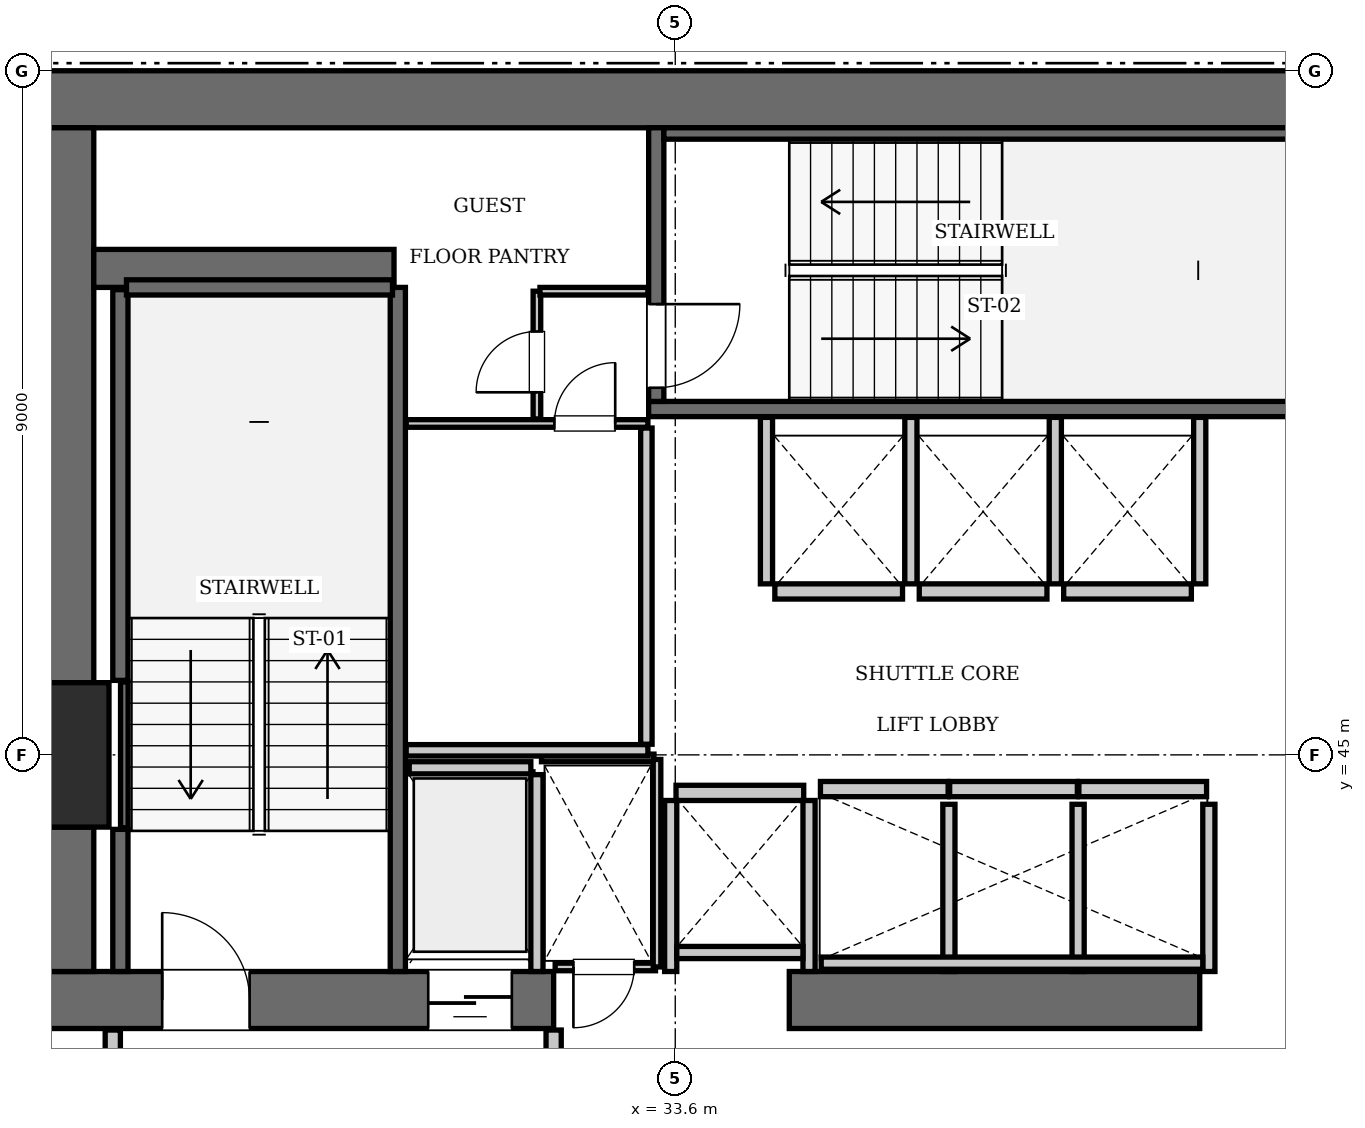
"""IFC4 building model, lengths in metres.
Left out: names, types, materials, properties, quantities, classifications, styles, units other than length and angle.
Written with IfcOpenShell. Run it as: python <this file> out.ifc"""

import sys

from ifc_helpers import new_model, si_unit, direction, frame, frame_2d, origin, origin_2d, place, context, subcontext, project, spatial, rectangle, extrude, element, fill, save


model = new_model("IFC4")
c1 = context("Model", 3, precision=1e-05, world=origin(), true_north=direction((0.0, 1.0)))
c2 = subcontext(c1, "Body", "Model", "MODEL_VIEW")
j1 = project(units=[si_unit("LENGTHUNIT", "METRE"), si_unit("PLANEANGLEUNIT", "RADIAN")], contexts=[c1])
p1 = place(None, origin())
s1 = spatial("IfcSite", under=j1, at=p1, CompositionType="ELEMENT")
p2 = place(p1, origin())
s2 = spatial("IfcBuilding", under=s1, at=p2, CompositionType="ELEMENT")
p3 = place(p2, frame((0.0, 0.0, 200.55)))
s3 = spatial("IfcBuildingStorey", under=s2, at=p3, CompositionType="ELEMENT", Elevation=200.55)
p4 = place(p3, frame((25.2, 45.0, 0.0), z_axis=(0.0, 0.0, 1.0), x_axis=(1.0, 0.0, 0.0)))
e1 = element("IfcColumn", 1, at=p4, inside=s3, PredefinedType="COLUMN", context=c2, shape_type="SweptSolid", body=[
    extrude(rectangle(XDim=1.9, YDim=1.9, at=origin_2d()), origin(), (0.0, 0.0, 1.0), 3.85),
])
p5 = place(p3, frame((25.2, 53.625, 0.0), z_axis=(0.0, 0.0, 1.0), x_axis=(1.0, 0.0, 0.0)))
e2 = element("IfcWall", 2, at=p5, inside=s3, PredefinedType="SHEAR", context=c2, shape_type="SweptSolid", body=[
    extrude(rectangle(XDim=25.2, YDim=0.75, at=frame_2d((12.6, 0.0))), origin(), (0.0, 0.0, 1.0), 3.85),
])
p6 = place(p3, frame((25.2, 41.775, 0.0), z_axis=(0.0, 0.0, 1.0), x_axis=(1.0, 0.0, 0.0)))
e3 = element("IfcWall", 3, at=p6, inside=s3, PredefinedType="SHEAR", context=c2, shape_type="SweptSolid", body=[
    extrude(rectangle(XDim=6.8, YDim=0.75, at=frame_2d((3.4, 0.0))), origin(), (0.0, 0.0, 1.0), 3.85),
])
p7 = place(p6, frame((1.65, 0.0, 0.0)))
e4 = element("IfcOpeningElement", 4, at=p7, cuts=e3, PredefinedType="OPENING", context=c2, shape_type="SweptSolid", body=[
    extrude(rectangle(XDim=1.15, YDim=2.15, at=frame_2d((0.575, 1.075))), frame((0.0, 0.385, 0.0), z_axis=(0.0, -1.0, 0.0), x_axis=(1.0, 0.0, 0.0)), (0.0, 0.0, 1.0), 0.77),
])
p8 = place(p6, frame((5.15, 0.0, 0.0)))
e5 = element("IfcOpeningElement", 5, at=p8, cuts=e3, PredefinedType="OPENING", context=c2, shape_type="SweptSolid", body=[
    extrude(rectangle(XDim=1.1, YDim=2.2, at=frame_2d((0.55, 1.1))), frame((0.0, 0.385, 0.0), z_axis=(0.0, -1.0, 0.0), x_axis=(1.0, 0.0, 0.0)), (0.0, 0.0, 1.0), 0.77),
])
p9 = place(p3, frame((35.1, 41.775, 0.0), z_axis=(0.0, 0.0, 1.0), x_axis=(1.0, 0.0, 0.0)))
e6 = element("IfcWall", 6, at=p9, inside=s3, PredefinedType="SHEAR", context=c2, shape_type="SweptSolid", body=[
    extrude(rectangle(XDim=5.4, YDim=0.75, at=frame_2d((2.7, 0.0))), origin(), (0.0, 0.0, 1.0), 3.85),
])
p10 = place(p3, frame((25.575, 42.15, 0.0), z_axis=(0.0, 0.0, 1.0), x_axis=(0.0, 1.0, 0.0)))
e7 = element("IfcWall", 7, at=p10, inside=s3, PredefinedType="SHEAR", context=c2, shape_type="SweptSolid", body=[
    extrude(rectangle(XDim=1.9, YDim=0.75, at=frame_2d((0.95, 0.0))), origin(), (0.0, 0.0, 1.0), 3.85),
])
p11 = place(p3, frame((25.575, 45.95, 0.0), z_axis=(0.0, 0.0, 1.0), x_axis=(0.0, 1.0, 0.0)))
e8 = element("IfcWall", 8, at=p11, inside=s3, PredefinedType="SHEAR", context=c2, shape_type="SweptSolid", body=[
    extrude(rectangle(XDim=7.3, YDim=0.75, at=frame_2d((3.65, 0.0))), origin(), (0.0, 0.0, 1.0), 3.85),
])
p12 = place(p3, frame((25.95, 51.4, 0.0), z_axis=(0.0, 0.0, 1.0), x_axis=(1.0, 0.0, 0.0)))
e9 = element("IfcWall", 9, at=p12, inside=s3, PredefinedType="SHEAR", context=c2, shape_type="SweptSolid", body=[
    extrude(rectangle(XDim=3.95, YDim=0.5, at=frame_2d((1.975, 0.0))), origin(), (0.0, 0.0, 1.0), 3.85),
])
p13 = place(p3, frame((29.95, 42.15, 0.0), z_axis=(0.0, 0.0, 1.0), x_axis=(0.0, 1.0, 0.0)))
e10 = element("IfcWall", 10, at=p13, inside=s3, PredefinedType="SOLIDWALL", context=c2, shape_type="SweptSolid", body=[
    extrude(rectangle(XDim=9.0, YDim=0.2, at=frame_2d((4.5, 0.0))), origin(), (0.0, 0.0, 1.0), 3.61),
])
p14 = place(p3, frame((26.3, 42.15, 0.0), z_axis=(0.0, 0.0, 1.0), x_axis=(0.0, 1.0, 0.0)))
e11 = element("IfcWall", 11, at=p14, inside=s3, PredefinedType="SOLIDWALL", context=c2, shape_type="SweptSolid", body=[
    extrude(rectangle(XDim=1.87, YDim=0.2, at=frame_2d((0.935, 0.0))), origin(), (0.0, 0.0, 1.0), 3.61),
])
p15 = place(p3, frame((26.3, 45.98, 0.0), z_axis=(0.0, 0.0, 1.0), x_axis=(0.0, 1.0, 0.0)))
e12 = element("IfcWall", 12, at=p15, inside=s3, PredefinedType="SOLIDWALL", context=c2, shape_type="SweptSolid", body=[
    extrude(rectangle(XDim=5.14, YDim=0.2, at=frame_2d((2.57, 0.0))), origin(), (0.0, 0.0, 1.0), 3.61),
])
p16 = place(p3, frame((26.38, 51.15, 0.0), z_axis=(0.0, 0.0, 1.0), x_axis=(1.0, 0.0, 0.0)))
e13 = element("IfcWall", 13, at=p16, inside=s3, PredefinedType="SOLIDWALL", context=c2, shape_type="SweptSolid", body=[
    extrude(rectangle(XDim=3.5, YDim=0.2, at=frame_2d((1.75, 0.0))), origin(), (0.0, 0.0, 1.0), 3.61),
])
p17 = place(p3, frame((26.352, 44.04, 0.0), z_axis=(0.0, 0.0, 1.0), x_axis=(0.0, 1.0, 0.0)))
e14 = element("IfcWall", 14, at=p17, inside=s3, PredefinedType="SOLIDWALL", context=c2, shape_type="SweptSolid", body=[
    extrude(rectangle(XDim=1.92, YDim=0.1, at=frame_2d((0.96, 0.0))), origin(), (0.0, 0.0, 1.0), 3.61),
])
p18 = place(p3, frame((33.25, 49.55, 0.0), z_axis=(0.0, 0.0, 1.0), x_axis=(1.0, 0.0, 0.0)))
e15 = element("IfcWall", 15, at=p18, inside=s3, PredefinedType="SOLIDWALL", context=c2, shape_type="SweptSolid", body=[
    extrude(rectangle(XDim=9.1, YDim=0.2, at=frame_2d((4.55, 0.0))), origin(), (0.0, 0.0, 1.0), 3.61),
])
p19 = place(p3, frame((33.35, 49.65, 0.0), z_axis=(0.0, 0.0, 1.0), x_axis=(0.0, 1.0, 0.0)))
e16 = element("IfcWall", 16, at=p19, inside=s3, PredefinedType="SOLIDWALL", context=c2, shape_type="SweptSolid", body=[
    extrude(rectangle(XDim=3.6, YDim=0.2, at=frame_2d((1.8, 0.0))), origin(), (0.0, 0.0, 1.0), 3.61),
])
p20 = place(p19, frame((0.18, 0.0, 0.0)))
e17 = element("IfcOpeningElement", 17, at=p20, cuts=e16, PredefinedType="OPENING", context=c2, shape_type="SweptSolid", body=[
    extrude(rectangle(XDim=1.1, YDim=2.15, at=frame_2d((0.55, 1.075))), frame((0.0, 0.11, 0.0), z_axis=(0.0, -1.0, 0.0), x_axis=(1.0, 0.0, 0.0)), (0.0, 0.0, 1.0), 0.22),
])
p21 = place(p3, frame((33.45, 53.175, 0.0), z_axis=(0.0, 0.0, 1.0), x_axis=(1.0, 0.0, 0.0)))
e18 = element("IfcWall", 18, at=p21, inside=s3, PredefinedType="SOLIDWALL", context=c2, shape_type="SweptSolid", body=[
    extrude(rectangle(XDim=8.7, YDim=0.15, at=frame_2d((4.35, 0.0))), origin(), (0.0, 0.0, 1.0), 3.61),
])
for number, where, z_axis, x_axis in (
    (19, (35.51, 44.55, 0.0), (0.0, 0.0, 1.0), (1.0, 0.0, 0.0)),
    (20, (37.21, 44.55, 0.0), (0.0, 0.0, 1.0), (1.0, 0.0, 0.0)),
):
    element("IfcWall", number, at=place(p3, frame(where, z_axis=z_axis, x_axis=x_axis)), inside=s3, PredefinedType="SOLIDWALL", context=c2, shape_type="SweptSolid", body=[
        extrude(rectangle(XDim=1.68, YDim=0.2, at=frame_2d((0.84, 0.0))), origin(), (0.0, 0.0, 1.0), 3.61),
    ])
for number, where, z_axis, x_axis in (
    (21, (38.91, 44.55, 0.0), (0.0, 0.0, 1.0), (1.0, 0.0, 0.0)),
    (22, (34.91, 47.15, 0.0), (0.0, 0.0, 1.0), (1.0, 0.0, 0.0)),
):
    element("IfcWall", number, at=place(p3, frame(where, z_axis=z_axis, x_axis=x_axis)), inside=s3, PredefinedType="SOLIDWALL", context=c2, shape_type="SweptSolid", body=[
        extrude(rectangle(XDim=1.68, YDim=0.2, at=frame_2d((0.84, 0.0))), origin(), (0.0, 0.0, 1.0), 3.61),
    ])
for number, where, z_axis, x_axis in (
    (23, (36.81, 47.15, 0.0), (0.0, 0.0, 1.0), (1.0, 0.0, 0.0)),
    (24, (38.71, 47.15, 0.0), (0.0, 0.0, 1.0), (1.0, 0.0, 0.0)),
    (25, (33.61, 44.5, 0.0), (0.0, 0.0, 1.0), (1.0, 0.0, 0.0)),
):
    element("IfcWall", number, at=place(p3, frame(where, z_axis=z_axis, x_axis=x_axis)), inside=s3, PredefinedType="SOLIDWALL", context=c2, shape_type="SweptSolid", body=[
        extrude(rectangle(XDim=1.68, YDim=0.2, at=frame_2d((0.84, 0.0))), origin(), (0.0, 0.0, 1.0), 3.61),
    ])
p22 = place(p3, frame((30.1, 44.83, 0.0), z_axis=(0.0, 0.0, 1.0), x_axis=(1.0, 0.0, 0.0)))
e26 = element("IfcWall", 26, at=p22, inside=s3, PredefinedType="SOLIDWALL", context=c2, shape_type="SweptSolid", body=[
    extrude(rectangle(XDim=1.6, YDim=0.16, at=frame_2d((0.8, 0.0))), origin(), (0.0, 0.0, 1.0), 3.61),
])
p23 = place(p3, frame((31.78, 42.15, 0.0), z_axis=(0.0, 0.0, 1.0), x_axis=(0.0, 1.0, 0.0)))
e27 = element("IfcWall", 27, at=p23, inside=s3, PredefinedType="SOLIDWALL", context=c2, shape_type="SweptSolid", body=[
    extrude(rectangle(XDim=2.59, YDim=0.16, at=frame_2d((1.295, 0.0))), origin(), (0.0, 0.0, 1.0), 3.61),
])
for number, where, z_axis, x_axis in (
    (28, (37.2, 42.15, 0.0), (0.0, 0.0, 1.0), (0.0, 1.0, 0.0)),
    (29, (38.9, 42.15, 0.0), (0.0, 0.0, 1.0), (0.0, 1.0, 0.0)),
    (30, (40.62, 42.15, 0.0), (0.0, 0.0, 1.0), (0.0, 1.0, 0.0)),
):
    element("IfcWall", number, at=place(p3, frame(where, z_axis=z_axis, x_axis=x_axis)), inside=s3, PredefinedType="SOLIDWALL", context=c2, shape_type="SweptSolid", body=[
        extrude(rectangle(XDim=2.2, YDim=0.16, at=frame_2d((1.1, 0.0))), origin(), (0.0, 0.0, 1.0), 3.61),
    ])
p24 = place(p3, frame((35.52, 42.26, 0.0), z_axis=(0.0, 0.0, 1.0), x_axis=(1.0, 0.0, 0.0)))
e31 = element("IfcWall", 31, at=p24, inside=s3, PredefinedType="SOLIDWALL", context=c2, shape_type="SweptSolid", body=[
    extrude(rectangle(XDim=5.02, YDim=0.16, at=frame_2d((2.51, 0.0))), origin(), (0.0, 0.0, 1.0), 3.61),
])
for number, where, z_axis, x_axis in (
    (32, (34.8, 47.25, 0.0), (0.0, 0.0, 1.0), (0.0, 1.0, 0.0)),
    (33, (36.7, 47.25, 0.0), (0.0, 0.0, 1.0), (0.0, 1.0, 0.0)),
    (34, (38.6, 47.25, 0.0), (0.0, 0.0, 1.0), (0.0, 1.0, 0.0)),
    (35, (40.5, 47.25, 0.0), (0.0, 0.0, 1.0), (0.0, 1.0, 0.0)),
):
    element("IfcWall", number, at=place(p3, frame(where, z_axis=z_axis, x_axis=x_axis)), inside=s3, PredefinedType="SOLIDWALL", context=c2, shape_type="SweptSolid", body=[
        extrude(rectangle(XDim=2.19, YDim=0.16, at=frame_2d((1.095, 0.0))), origin(), (0.0, 0.0, 1.0), 3.61),
    ])
for number, where, z_axis, x_axis in (
    (36, (33.54, 42.15, 0.0), (0.0, 0.0, 1.0), (0.0, 1.0, 0.0)),
    (37, (35.36, 42.15, 0.0), (0.0, 0.0, 1.0), (0.0, 1.0, 0.0)),
):
    element("IfcWall", number, at=place(p3, frame(where, z_axis=z_axis, x_axis=x_axis)), inside=s3, PredefinedType="SOLIDWALL", context=c2, shape_type="SweptSolid", body=[
        extrude(rectangle(XDim=2.25, YDim=0.16, at=frame_2d((1.125, 0.0))), origin(), (0.0, 0.0, 1.0), 3.61),
    ])
p25 = place(p3, frame((33.62, 42.4, 0.0), z_axis=(0.0, 0.0, 1.0), x_axis=(1.0, 0.0, 0.0)))
e38 = element("IfcWall", 38, at=p25, inside=s3, PredefinedType="SOLIDWALL", context=c2, shape_type="SweptSolid", body=[
    extrude(rectangle(XDim=1.66, YDim=0.16, at=frame_2d((0.83, 0.0))), origin(), (0.0, 0.0, 1.0), 3.61),
])
for number, where, z_axis, x_axis in (
    (39, (26.2, 38.31, 0.0), (0.0, 0.0, 1.0), (0.0, 1.0, 0.0)),
    (40, (32.0, 38.31, 0.0), (0.0, 0.0, 1.0), (0.0, 1.0, 0.0)),
):
    element("IfcWall", number, at=place(p3, frame(where, z_axis=z_axis, x_axis=x_axis)), inside=s3, PredefinedType="PARTITIONING", context=c2, shape_type="SweptSolid", body=[
        extrude(rectangle(XDim=3.07, YDim=0.2, at=frame_2d((1.535, 0.0))), origin(), (0.0, 0.0, 1.0), 3.61),
    ])
p26 = place(p3, frame((32.02, 42.21, 0.0), z_axis=(0.0, 0.0, 1.0), x_axis=(1.0, 0.0, 0.0)))
e41 = element("IfcWall", 41, at=p26, inside=s3, PredefinedType="PARTITIONING", context=c2, shape_type="SweptSolid", body=[
    extrude(rectangle(XDim=1.32, YDim=0.1, at=frame_2d((0.66, 0.0))), origin(), (0.0, 0.0, 1.0), 3.61),
])
p27 = place(p26, frame((0.24, 0.0, 0.0)))
e42 = element("IfcOpeningElement", 42, at=p27, cuts=e41, PredefinedType="OPENING", context=c2, shape_type="SweptSolid", body=[
    extrude(rectangle(XDim=0.8, YDim=2.05, at=frame_2d((0.4, 1.025))), frame((0.0, 0.06, 0.0), z_axis=(0.0, -1.0, 0.0), x_axis=(1.0, 0.0, 0.0)), (0.0, 0.0, 1.0), 0.12),
])
p28 = place(p3, frame((31.84, 44.96, 0.0), z_axis=(0.0, 0.0, 1.0), x_axis=(1.0, 0.0, 0.0)))
e43 = element("IfcWall", 43, at=p28, inside=s3, PredefinedType="PARTITIONING", context=c2, shape_type="SweptSolid", body=[
    extrude(rectangle(XDim=1.48, YDim=0.1, at=frame_2d((0.74, 0.0))), origin(), (0.0, 0.0, 1.0), 3.61),
])
p29 = place(p3, frame((33.36, 42.21, 0.0), z_axis=(0.0, 0.0, 1.0), x_axis=(0.0, 1.0, 0.0)))
e44 = element("IfcWall", 44, at=p29, inside=s3, PredefinedType="PARTITIONING", context=c2, shape_type="SweptSolid", body=[
    extrude(rectangle(XDim=2.73, YDim=0.1, at=frame_2d((1.365, 0.0))), origin(), (0.0, 0.0, 1.0), 3.61),
])
p30 = place(p3, frame((30.06, 45.06, 0.0), z_axis=(0.0, 0.0, 1.0), x_axis=(1.0, 0.0, 0.0)))
e45 = element("IfcWall", 45, at=p30, inside=s3, PredefinedType="PARTITIONING", context=c2, shape_type="SweptSolid", body=[
    extrude(rectangle(XDim=3.18, YDim=0.15, at=frame_2d((1.59, 0.0))), origin(), (0.0, 0.0, 1.0), 3.61),
])
p31 = place(p3, frame((33.22, 45.14, 0.0), z_axis=(0.0, 0.0, 1.0), x_axis=(0.0, 1.0, 0.0)))
e46 = element("IfcWall", 46, at=p31, inside=s3, PredefinedType="PARTITIONING", context=c2, shape_type="SweptSolid", body=[
    extrude(rectangle(XDim=4.16, YDim=0.15, at=frame_2d((2.08, 0.0))), origin(), (0.0, 0.0, 1.0), 3.61),
])
p32 = place(p3, frame((30.06, 49.36, 0.0), z_axis=(0.0, 0.0, 1.0), x_axis=(1.0, 0.0, 0.0)))
e47 = element("IfcWall", 47, at=p32, inside=s3, PredefinedType="PARTITIONING", context=c2, shape_type="SweptSolid", body=[
    extrude(rectangle(XDim=3.18, YDim=0.1, at=frame_2d((1.59, 0.0))), origin(), (0.0, 0.0, 1.0), 3.61),
])
p33 = place(p32, frame((1.95, 0.0, 0.0)))
e48 = element("IfcOpeningElement", 48, at=p33, cuts=e47, PredefinedType="OPENING", context=c2, shape_type="SweptSolid", body=[
    extrude(rectangle(XDim=0.8, YDim=2.05, at=frame_2d((0.4, 1.025))), frame((0.0, 0.06, 0.0), z_axis=(0.0, -1.0, 0.0), x_axis=(1.0, 0.0, 0.0)), (0.0, 0.0, 1.0), 0.12),
])
p34 = place(p3, frame((31.78, 49.42, 0.0), z_axis=(0.0, 0.0, 1.0), x_axis=(0.0, 1.0, 0.0)))
e49 = element("IfcWall", 49, at=p34, inside=s3, PredefinedType="PARTITIONING", context=c2, shape_type="SweptSolid", body=[
    extrude(rectangle(XDim=1.68, YDim=0.1, at=frame_2d((0.84, 0.0))), origin(), (0.0, 0.0, 1.0), 3.61),
])
p35 = place(p34, frame((0.35, 0.0, 0.0)))
e50 = element("IfcOpeningElement", 50, at=p35, cuts=e49, PredefinedType="OPENING", context=c2, shape_type="SweptSolid", body=[
    extrude(rectangle(XDim=0.8, YDim=2.05, at=frame_2d((0.4, 1.025))), frame((0.0, 0.06, 0.0), z_axis=(0.0, -1.0, 0.0), x_axis=(1.0, 0.0, 0.0)), (0.0, 0.0, 1.0), 0.12),
])
p36 = place(p3, frame((31.82, 51.1, 0.0), z_axis=(0.0, 0.0, 1.0), x_axis=(1.0, 0.0, 0.0)))
e51 = element("IfcWall", 51, at=p36, inside=s3, PredefinedType="PARTITIONING", context=c2, shape_type="SweptSolid", body=[
    extrude(rectangle(XDim=1.42, YDim=0.1, at=frame_2d((0.71, 0.0))), origin(), (0.0, 0.0, 1.0), 3.61),
])
p37 = place(p7, origin())
e52 = element("IfcDoor", 52, at=p37, inside=s3, OperationType="SINGLE_SWING_LEFT", PredefinedType="DOOR", context=c2, shape_type="SweptSolid", body=[
    extrude(rectangle(XDim=1.15, YDim=2.15, at=frame_2d((0.575, 1.075))), frame((0.0, 0.025, 0.0), z_axis=(0.0, -1.0, 0.0), x_axis=(1.0, 0.0, 0.0)), (0.0, 0.0, 1.0), 0.05),
])
fill(e4, e52)
p38 = place(p20, frame((1.1, 0.0, 0.0), z_axis=(0.0, 0.0, 1.0), x_axis=(-1.0, 0.0, 0.0)))
e53 = element("IfcDoor", 53, at=p38, inside=s3, OperationType="SINGLE_SWING_LEFT", PredefinedType="DOOR", context=c2, shape_type="SweptSolid", body=[
    extrude(rectangle(XDim=1.1, YDim=2.15, at=frame_2d((0.55, 1.075))), frame((0.0, 0.025, 0.0), z_axis=(0.0, -1.0, 0.0), x_axis=(1.0, 0.0, 0.0)), (0.0, 0.0, 1.0), 0.05),
])
fill(e17, e53)
p39 = place(p8, frame((1.1, 0.0, 0.0), z_axis=(0.0, 0.0, 1.0), x_axis=(-1.0, 0.0, 0.0)))
e54 = element("IfcDoor", 54, at=p39, inside=s3, OperationType="SLIDING_TO_LEFT", PredefinedType="DOOR", context=c2, shape_type="SweptSolid", body=[
    extrude(rectangle(XDim=1.1, YDim=2.2, at=frame_2d((0.55, 1.1))), frame((0.0, 0.025, 0.0), z_axis=(0.0, -1.0, 0.0), x_axis=(1.0, 0.0, 0.0)), (0.0, 0.0, 1.0), 0.05),
])
fill(e5, e54)
p40 = place(p27, frame((0.8, 0.0, 0.0), z_axis=(0.0, 0.0, 1.0), x_axis=(-1.0, 0.0, 0.0)))
e55 = element("IfcDoor", 55, at=p40, inside=s3, OperationType="SINGLE_SWING_RIGHT", PredefinedType="DOOR", context=c2, shape_type="SweptSolid", body=[
    extrude(rectangle(XDim=0.8, YDim=2.05, at=frame_2d((0.4, 1.025))), frame((0.0, 0.025, 0.0), z_axis=(0.0, -1.0, 0.0), x_axis=(1.0, 0.0, 0.0)), (0.0, 0.0, 1.0), 0.05),
])
fill(e42, e55)
p41 = place(p33, origin())
e56 = element("IfcDoor", 56, at=p41, inside=s3, OperationType="SINGLE_SWING_RIGHT", PredefinedType="DOOR", context=c2, shape_type="SweptSolid", body=[
    extrude(rectangle(XDim=0.8, YDim=2.05, at=frame_2d((0.4, 1.025))), frame((0.0, 0.025, 0.0), z_axis=(0.0, -1.0, 0.0), x_axis=(1.0, 0.0, 0.0)), (0.0, 0.0, 1.0), 0.05),
])
fill(e48, e56)
p42 = place(p35, origin())
e57 = element("IfcDoor", 57, at=p42, inside=s3, OperationType="SINGLE_SWING_LEFT", PredefinedType="DOOR", context=c2, shape_type="SweptSolid", body=[
    extrude(rectangle(XDim=0.8, YDim=2.05, at=frame_2d((0.4, 1.025))), frame((0.0, 0.025, 0.0), z_axis=(0.0, -1.0, 0.0), x_axis=(1.0, 0.0, 0.0)), (0.0, 0.0, 1.0), 0.05),
])
fill(e50, e57)
save(model, sys.argv[1])
